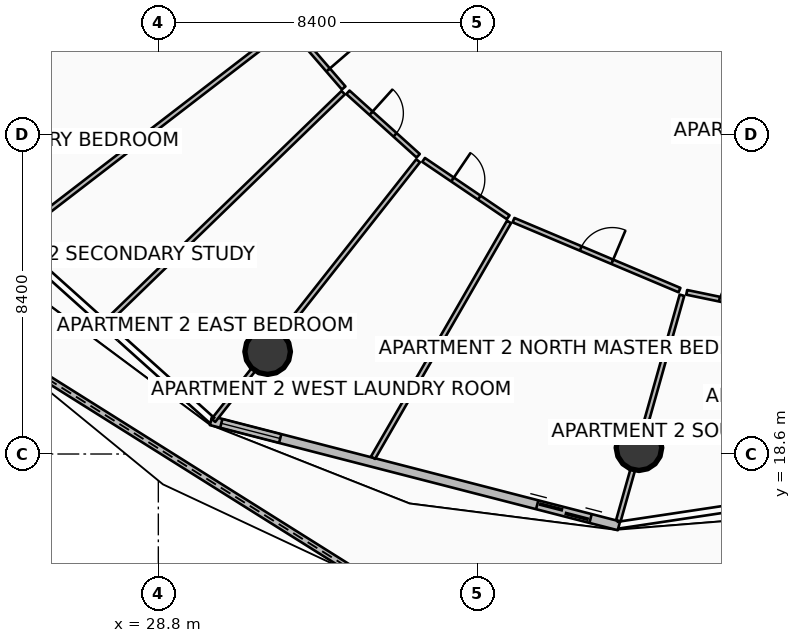
"""IFC4 building model, lengths in metres.
Left out: names, types, materials, properties, quantities, classifications, styles, units other than length and angle.
Written with IfcOpenShell. Run it as: python <this file> out.ifc"""

import sys

from ifc_helpers import new_model, si_unit, direction, frame, frame_2d, origin, origin_2d, place, context, subcontext, project, spatial, polyline, rectangle, circle, outline, extrude, element, fill, save


model = new_model("IFC4")
c1 = context("Model", 3, precision=1e-05, world=origin(), true_north=direction((0.0, 1.0)))
c2 = subcontext(c1, "Body", "Model", "MODEL_VIEW")
j1 = project(units=[si_unit("LENGTHUNIT", "METRE"), si_unit("PLANEANGLEUNIT", "RADIAN")], contexts=[c1])
p1 = place(None, origin())
s1 = spatial("IfcSite", under=j1, at=p1, CompositionType="ELEMENT")
p2 = place(p1, origin())
s2 = spatial("IfcBuilding", under=s1, at=p2, CompositionType="ELEMENT")
p3 = place(p2, frame((0.0, 0.0, 108.9)))
s3 = spatial("IfcBuildingStorey", under=s2, at=p3, CompositionType="ELEMENT", Elevation=108.9)
for number, where, z_axis, x_axis in (
    (1, (31.677, 21.294, 0.0), (0.0, 0.0, 1.0), (1.0, 0.0, 0.0)),
    (2, (41.447, 18.766, 0.0), (0.0, 0.0, 1.0), (1.0, 0.0, 0.0)),
):
    element("IfcColumn", number, at=place(p3, frame(where, z_axis=z_axis, x_axis=x_axis)), inside=s3, PredefinedType="COLUMN", context=c2, shape_type="SweptSolid", body=[
        extrude(circle(Radius=0.6, at=origin_2d()), origin(), (0.0, 0.0, 1.0), 3.5),
    ])
p4 = place(p3, frame((24.345, 21.546, 0.0), z_axis=(0.0, 0.0, 1.0), x_axis=(0.846860965628, -0.531814351908, 0.0)))
e3 = element("IfcWall", 3, at=p4, inside=s3, PredefinedType="PARAPET", context=c2, shape_type="SweptSolid", body=[
    extrude(outline(polyline([(0.0, 0.0), (11.718, 0.0), (11.718, 1.632), (5.859, 1.418), (0.0, 1.233), (0.0, 0.0)])), frame((0.0, 0.09, 0.0), z_axis=(0.0, -1.0, 0.0), x_axis=(1.0, 0.0, 0.0)), (0.0, 0.0, 1.0), 0.18),
])
p5 = place(p3, frame((30.186, 19.477, 0.0), z_axis=(0.0, 0.0, 1.0), x_axis=(0.968356180858, -0.249572248045, 0.0)))
e4 = element("IfcWall", 4, at=p5, inside=s3, PredefinedType="SOLIDWALL", context=c2, shape_type="SweptSolid", body=[
    extrude(rectangle(XDim=11.084, YDim=0.24, at=frame_2d((5.542, 0.0))), origin(), (0.0, 0.0, 1.0), 2.45),
])
p6 = place(p5, frame((8.865, 0.0, 0.0)))
e5 = element("IfcOpeningElement", 5, at=p6, cuts=e4, PredefinedType="OPENING", context=c2, shape_type="SweptSolid", body=[
    extrude(rectangle(XDim=1.45, YDim=2.15, at=frame_2d((0.725, 1.075))), frame((0.0, 0.13, 0.0), z_axis=(0.0, -1.0, 0.0), x_axis=(1.0, 0.0, 0.0)), (0.0, 0.0, 1.0), 0.26),
])
p7 = place(p5, frame((0.28, 0.0, 0.65)))
e6 = element("IfcOpeningElement", 6, at=p7, cuts=e4, PredefinedType="OPENING", context=c2, shape_type="SweptSolid", body=[
    extrude(rectangle(XDim=1.6, YDim=1.5, at=frame_2d((0.8, 0.75))), frame((0.0, 0.13, 0.0), z_axis=(0.0, -1.0, 0.0), x_axis=(1.0, 0.0, 0.0)), (0.0, 0.0, 1.0), 0.26),
])
p8 = place(p3, frame((30.575, 32.241, 0.0), z_axis=(0.0, 0.0, 1.0), x_axis=(-0.872502512898, -0.488609624328, 0.0)))
e7 = element("IfcWall", 7, at=p8, inside=s3, PredefinedType="PARTITIONING", context=c2, shape_type="SweptSolid", body=[
    extrude(rectangle(XDim=9.508, YDim=0.125, at=frame_2d((4.754, 0.0))), origin(), (0.0, 0.0, 1.0), 2.94),
])
p9 = place(p3, frame((32.179, 29.827, 0.0), z_axis=(0.0, 0.0, 1.0), x_axis=(-0.792545547833, -0.609812720932, 0.0)))
e8 = element("IfcWall", 8, at=p9, inside=s3, PredefinedType="PARTITIONING", context=c2, shape_type="SweptSolid", body=[
    extrude(rectangle(XDim=9.141, YDim=0.125, at=frame_2d((4.571, 0.0))), origin(), (0.0, 0.0, 1.0), 2.94),
])
p10 = place(p3, frame((33.665, 28.108, 0.0), z_axis=(0.0, 0.0, 1.0), x_axis=(-0.718119545748, -0.695919764064, 0.0)))
e9 = element("IfcWall", 9, at=p10, inside=s3, PredefinedType="PARTITIONING", context=c2, shape_type="SweptSolid", body=[
    extrude(rectangle(XDim=8.721, YDim=0.125, at=frame_2d((4.36, 0.0))), origin(), (0.0, 0.0, 1.0), 2.94),
])
p11 = place(p3, frame((32.302, 29.822, 0.0), z_axis=(0.0, 0.0, 1.0), x_axis=(0.653904073591, -0.756577466318, 0.0)))
e10 = element("IfcWall", 10, at=p11, inside=s3, PredefinedType="PARTITIONING", context=c2, shape_type="SweptSolid", body=[
    extrude(rectangle(XDim=2.102, YDim=0.125, at=frame_2d((1.051, 0.0))), origin(), (0.0, 0.0, 1.0), 2.94),
])
p12 = place(p11, frame((0.626, 0.0, 0.0)))
e11 = element("IfcOpeningElement", 11, at=p12, cuts=e10, PredefinedType="OPENING", context=c2, shape_type="SweptSolid", body=[
    extrude(rectangle(XDim=0.85, YDim=2.06, at=frame_2d((0.425, 1.03))), frame((0.0, 0.073, 0.0), z_axis=(0.0, -1.0, 0.0), x_axis=(1.0, 0.0, 0.0)), (0.0, 0.0, 1.0), 0.145),
])
p13 = place(p3, frame((33.789, 28.117, 0.0), z_axis=(0.0, 0.0, 1.0), x_axis=(0.742250438722, -0.670122590439, 0.0)))
e12 = element("IfcWall", 12, at=p13, inside=s3, PredefinedType="PARTITIONING", context=c2, shape_type="SweptSolid", body=[
    extrude(rectangle(XDim=2.491, YDim=0.125, at=frame_2d((1.246, 0.0))), origin(), (0.0, 0.0, 1.0), 2.94),
])
p14 = place(p13, frame((0.821, 0.0, 0.0)))
e13 = element("IfcOpeningElement", 13, at=p14, cuts=e12, PredefinedType="OPENING", context=c2, shape_type="SweptSolid", body=[
    extrude(rectangle(XDim=0.85, YDim=2.06, at=frame_2d((0.425, 1.03))), frame((0.0, 0.073, 0.0), z_axis=(0.0, -1.0, 0.0), x_axis=(1.0, 0.0, 0.0)), (0.0, 0.0, 1.0), 0.145),
])
p15 = place(p3, frame((35.635, 26.316, 0.0), z_axis=(0.0, 0.0, 1.0), x_axis=(-0.619089966413, -0.785320070727, 0.0)))
e14 = element("IfcWall", 14, at=p15, inside=s3, PredefinedType="PARTITIONING", context=c2, shape_type="SweptSolid", body=[
    extrude(rectangle(XDim=8.699, YDim=0.125, at=frame_2d((4.35, 0.0))), origin(), (0.0, 0.0, 1.0), 2.94),
])
p16 = place(p3, frame((38.028, 24.707, 0.0), z_axis=(0.0, 0.0, 1.0), x_axis=(-0.499570967342, -0.866272964249, 0.0)))
e15 = element("IfcWall", 15, at=p16, inside=s3, PredefinedType="PARTITIONING", context=c2, shape_type="SweptSolid", body=[
    extrude(rectangle(XDim=7.162, YDim=0.125, at=frame_2d((3.581, 0.0))), origin(), (0.0, 0.0, 1.0), 2.94),
])
p17 = place(p3, frame((35.78, 26.338, 0.0), z_axis=(0.0, 0.0, 1.0), x_axis=(0.827963562543, -0.560781899762, 0.0)))
e16 = element("IfcWall", 16, at=p17, inside=s3, PredefinedType="PARTITIONING", context=c2, shape_type="SweptSolid", body=[
    extrude(rectangle(XDim=2.689, YDim=0.125, at=frame_2d((1.345, 0.0))), origin(), (0.0, 0.0, 1.0), 2.94),
])
p18 = place(p17, frame((0.92, 0.0, 0.0)))
e17 = element("IfcOpeningElement", 17, at=p18, cuts=e16, PredefinedType="OPENING", context=c2, shape_type="SweptSolid", body=[
    extrude(rectangle(XDim=0.85, YDim=2.06, at=frame_2d((0.425, 1.03))), frame((0.0, 0.073, 0.0), z_axis=(0.0, -1.0, 0.0), x_axis=(1.0, 0.0, 0.0)), (0.0, 0.0, 1.0), 0.145),
])
p19 = place(p3, frame((38.147, 24.754, 0.0), z_axis=(0.0, 0.0, 1.0), x_axis=(0.921465596947, -0.388459976888, 0.0)))
e18 = element("IfcWall", 18, at=p19, inside=s3, PredefinedType="PARTITIONING", context=c2, shape_type="SweptSolid", body=[
    extrude(rectangle(XDim=4.74, YDim=0.125, at=frame_2d((2.37, 0.0))), origin(), (0.0, 0.0, 1.0), 2.94),
])
p20 = place(p19, frame((1.92, 0.0, 0.0)))
e19 = element("IfcOpeningElement", 19, at=p20, cuts=e18, PredefinedType="OPENING", context=c2, shape_type="SweptSolid", body=[
    extrude(rectangle(XDim=0.9, YDim=2.08, at=frame_2d((0.45, 1.04))), frame((0.0, 0.073, 0.0), z_axis=(0.0, -1.0, 0.0), x_axis=(1.0, 0.0, 0.0)), (0.0, 0.0, 1.0), 0.145),
])
p21 = place(p3, frame((42.579, 22.778, 0.0), z_axis=(0.0, 0.0, 1.0), x_axis=(-0.271466748189, -0.962447819171, 0.0)))
e20 = element("IfcWall", 20, at=p21, inside=s3, PredefinedType="PARTITIONING", context=c2, shape_type="SweptSolid", body=[
    extrude(rectangle(XDim=6.166, YDim=0.125, at=frame_2d((3.083, 0.0))), origin(), (0.0, 0.0, 1.0), 2.94),
])
p22 = place(p3, frame((42.704, 22.854, 0.0), z_axis=(0.0, 0.0, 1.0), x_axis=(0.979145769619, -0.203158957069, 0.0)))
e21 = element("IfcWall", 21, at=p22, inside=s3, PredefinedType="PARTITIONING", context=c2, shape_type="SweptSolid", body=[
    extrude(rectangle(XDim=2.611, YDim=0.125, at=frame_2d((1.306, 0.0))), origin(), (0.0, 0.0, 1.0), 2.94),
])
p23 = place(p22, frame((0.881, 0.0, 0.0)))
e22 = element("IfcOpeningElement", 22, at=p23, cuts=e21, PredefinedType="OPENING", context=c2, shape_type="SweptSolid", body=[
    extrude(rectangle(XDim=0.85, YDim=2.06, at=frame_2d((0.425, 1.03))), frame((0.0, 0.073, 0.0), z_axis=(0.0, -1.0, 0.0), x_axis=(1.0, 0.0, 0.0)), (0.0, 0.0, 1.0), 0.145),
])
p24 = place(p6, origin())
e23 = element("IfcDoor", 23, at=p24, inside=s3, OperationType="DOUBLE_DOOR_SLIDING", PredefinedType="DOOR", context=c2, shape_type="SweptSolid", body=[
    extrude(rectangle(XDim=1.45, YDim=2.15, at=frame_2d((0.725, 1.075))), frame((0.0, 0.025, 0.0), z_axis=(0.0, -1.0, 0.0), x_axis=(1.0, 0.0, 0.0)), (0.0, 0.0, 1.0), 0.05),
])
fill(e5, e23)
p25 = place(p7, origin())
e24 = element("IfcWindow", 24, at=p25, inside=s3, PartitioningType="SINGLE_PANEL", PredefinedType="WINDOW", context=c2, shape_type="SweptSolid", body=[
    extrude(rectangle(XDim=1.6, YDim=1.5, at=frame_2d((0.8, 0.75))), frame((0.0, 0.03, 0.0), z_axis=(0.0, -1.0, 0.0), x_axis=(1.0, 0.0, 0.0)), (0.0, 0.0, 1.0), 0.06),
])
fill(e6, e24)
p26 = place(p12, origin())
e25 = element("IfcDoor", 25, at=p26, inside=s3, OperationType="SINGLE_SWING_RIGHT", PredefinedType="DOOR", context=c2, shape_type="SweptSolid", body=[
    extrude(rectangle(XDim=0.85, YDim=2.06, at=frame_2d((0.425, 1.03))), frame((0.0, 0.025, 0.0), z_axis=(0.0, -1.0, 0.0), x_axis=(1.0, 0.0, 0.0)), (0.0, 0.0, 1.0), 0.05),
])
fill(e11, e25)
p27 = place(p14, origin())
e26 = element("IfcDoor", 26, at=p27, inside=s3, OperationType="SINGLE_SWING_LEFT", PredefinedType="DOOR", context=c2, shape_type="SweptSolid", body=[
    extrude(rectangle(XDim=0.85, YDim=2.06, at=frame_2d((0.425, 1.03))), frame((0.0, 0.025, 0.0), z_axis=(0.0, -1.0, 0.0), x_axis=(1.0, 0.0, 0.0)), (0.0, 0.0, 1.0), 0.05),
])
fill(e13, e26)
p28 = place(p18, origin())
e27 = element("IfcDoor", 27, at=p28, inside=s3, OperationType="SINGLE_SWING_LEFT", PredefinedType="DOOR", context=c2, shape_type="SweptSolid", body=[
    extrude(rectangle(XDim=0.85, YDim=2.06, at=frame_2d((0.425, 1.03))), frame((0.0, 0.025, 0.0), z_axis=(0.0, -1.0, 0.0), x_axis=(1.0, 0.0, 0.0)), (0.0, 0.0, 1.0), 0.05),
])
fill(e17, e27)
p29 = place(p20, origin())
e28 = element("IfcDoor", 28, at=p29, inside=s3, OperationType="SINGLE_SWING_RIGHT", PredefinedType="DOOR", context=c2, shape_type="SweptSolid", body=[
    extrude(rectangle(XDim=0.9, YDim=2.08, at=frame_2d((0.45, 1.04))), frame((0.0, 0.025, 0.0), z_axis=(0.0, -1.0, 0.0), x_axis=(1.0, 0.0, 0.0)), (0.0, 0.0, 1.0), 0.05),
])
fill(e19, e28)
p30 = place(p23, origin())
e29 = element("IfcDoor", 29, at=p30, inside=s3, OperationType="SINGLE_SWING_RIGHT", PredefinedType="DOOR", context=c2, shape_type="SweptSolid", body=[
    extrude(rectangle(XDim=0.85, YDim=2.06, at=frame_2d((0.425, 1.03))), frame((0.0, 0.025, 0.0), z_axis=(0.0, -1.0, 0.0), x_axis=(1.0, 0.0, 0.0)), (0.0, 0.0, 1.0), 0.05),
])
fill(e22, e29)
save(model, sys.argv[1])
